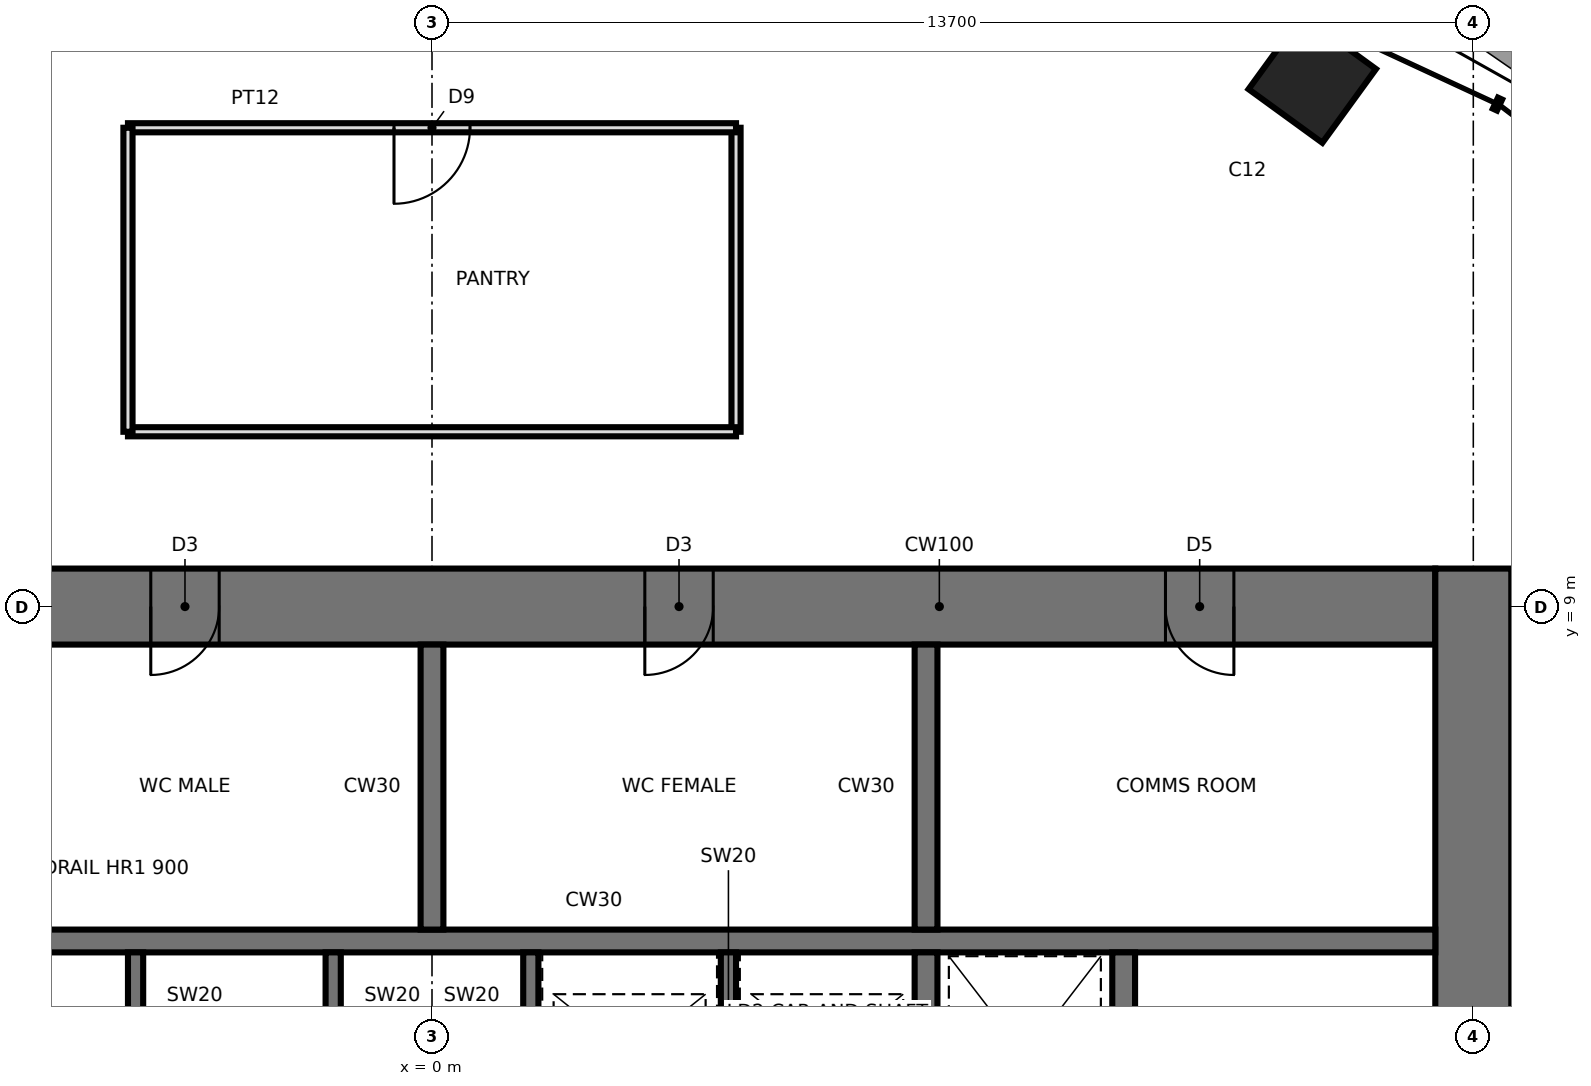
"""IFC4 building model, lengths in metres.
Left out: names, types, materials, properties, quantities, classifications, styles, units other than length and angle.
Written with IfcOpenShell. Run it as: python <this file> out.ifc"""

import sys

from ifc_helpers import new_model, si_unit, direction, frame, frame_2d, origin, origin_2d, place, context, subcontext, project, spatial, rectangle, extrude, element, fill, save


model = new_model("IFC4")
c1 = context("Model", 3, precision=1e-05, world=origin(), true_north=direction((0.0, 1.0)))
c2 = subcontext(c1, "Body", "Model", "MODEL_VIEW")
j1 = project(units=[si_unit("LENGTHUNIT", "METRE"), si_unit("PLANEANGLEUNIT", "RADIAN")], contexts=[c1])
p1 = place(None, origin())
s1 = spatial("IfcSite", under=j1, at=p1, CompositionType="ELEMENT")
p2 = place(p1, origin())
s2 = spatial("IfcBuilding", under=s1, at=p2, CompositionType="ELEMENT")
p3 = place(p2, frame((0.0, 0.0, 272.8)))
s3 = spatial("IfcBuildingStorey", under=s2, at=p3, CompositionType="ELEMENT", Elevation=272.8)
p4 = place(p3, frame((11.581, 15.94, 0.0), z_axis=(0.0, 0.0, 1.0), x_axis=(0.587785252292, 0.809016994375, 0.0)))
e1 = element("IfcColumn", 1, at=p4, inside=s3, PredefinedType="COLUMN", context=c2, shape_type="SweptSolid", body=[
    extrude(rectangle(XDim=1.2, YDim=1.2, at=origin_2d()), origin(), (0.0, 0.0, 1.0), 4.2),
])
p5 = place(p3, frame((13.2, 9.0, 0.0), z_axis=(0.0, 0.0, 1.0), x_axis=(-1.0, 0.0, 0.0)))
e2 = element("IfcWall", 2, at=p5, inside=s3, PredefinedType="SHEAR", context=c2, shape_type="SweptSolid", body=[
    extrude(rectangle(XDim=26.4, YDim=1.0, at=frame_2d((13.2, 0.0))), origin(), (0.0, 0.0, 1.0), 4.2),
])
p6 = place(p5, frame((2.65, 0.0, 0.0)))
e3 = element("IfcOpeningElement", 3, at=p6, cuts=e2, PredefinedType="OPENING", context=c2, shape_type="SweptSolid", body=[
    extrude(rectangle(XDim=0.9, YDim=2.1, at=frame_2d((0.45, 1.05))), frame((0.0, 0.51, 0.0), z_axis=(0.0, -1.0, 0.0), x_axis=(1.0, 0.0, 0.0)), (0.0, 0.0, 1.0), 1.02),
])
p7 = place(p5, frame((9.5, 0.0, 0.0)))
e4 = element("IfcOpeningElement", 4, at=p7, cuts=e2, PredefinedType="OPENING", context=c2, shape_type="SweptSolid", body=[
    extrude(rectangle(XDim=0.9, YDim=2.1, at=frame_2d((0.45, 1.05))), frame((0.0, 0.51, 0.0), z_axis=(0.0, -1.0, 0.0), x_axis=(1.0, 0.0, 0.0)), (0.0, 0.0, 1.0), 1.02),
])
p8 = place(p5, frame((16.0, 0.0, 0.0)))
e5 = element("IfcOpeningElement", 5, at=p8, cuts=e2, PredefinedType="OPENING", context=c2, shape_type="SweptSolid", body=[
    extrude(rectangle(XDim=0.9, YDim=2.1, at=frame_2d((0.45, 1.05))), frame((0.0, 0.51, 0.0), z_axis=(0.0, -1.0, 0.0), x_axis=(1.0, 0.0, 0.0)), (0.0, 0.0, 1.0), 1.02),
])
p9 = place(p5, frame((21.25, 0.0, 0.0)))
e6 = element("IfcOpeningElement", 6, at=p9, cuts=e2, PredefinedType="OPENING", context=c2, shape_type="SweptSolid", body=[
    extrude(rectangle(XDim=0.9, YDim=2.1, at=frame_2d((0.45, 1.05))), frame((0.0, 0.51, 0.0), z_axis=(0.0, -1.0, 0.0), x_axis=(1.0, 0.0, 0.0)), (0.0, 0.0, 1.0), 1.02),
])
p10 = place(p5, frame((24.8, 0.0, 0.0)))
e7 = element("IfcOpeningElement", 7, at=p10, cuts=e2, PredefinedType="OPENING", context=c2, shape_type="SweptSolid", body=[
    extrude(rectangle(XDim=1.0, YDim=2.1, at=frame_2d((0.5, 1.05))), frame((0.0, 0.51, 0.0), z_axis=(0.0, -1.0, 0.0), x_axis=(1.0, 0.0, 0.0)), (0.0, 0.0, 1.0), 1.02),
])
p11 = place(p3, frame((13.7, -9.5, 0.0), z_axis=(0.0, 0.0, 1.0), x_axis=(0.0, 1.0, 0.0)))
e8 = element("IfcWall", 8, at=p11, inside=s3, PredefinedType="SHEAR", context=c2, shape_type="SweptSolid", body=[
    extrude(rectangle(XDim=19.0, YDim=1.0, at=frame_2d((9.5, 0.0))), origin(), (0.0, 0.0, 1.0), 4.2),
])
p12 = place(p11, frame((8.6, 0.0, 0.0)))
e9 = element("IfcOpeningElement", 9, at=p12, cuts=e8, PredefinedType="OPENING", context=c2, shape_type="SweptSolid", body=[
    extrude(rectangle(XDim=1.8, YDim=2.4, at=frame_2d((0.9, 1.2))), frame((0.0, 0.51, 0.0), z_axis=(0.0, -1.0, 0.0), x_axis=(1.0, 0.0, 0.0)), (0.0, 0.0, 1.0), 1.02),
])
p13 = place(p3, frame((-13.2, 4.6, 0.0), z_axis=(0.0, 0.0, 1.0), x_axis=(1.0, 0.0, 0.0)))
e10 = element("IfcWall", 10, at=p13, inside=s3, PredefinedType="SHEAR", context=c2, shape_type="SweptSolid", body=[
    extrude(rectangle(XDim=26.4, YDim=0.3, at=frame_2d((13.2, 0.0))), origin(), (0.0, 0.0, 1.0), 4.2),
])
p14 = place(p3, frame((6.5, 1.75, 0.0), z_axis=(0.0, 0.0, 1.0), x_axis=(0.0, 1.0, 0.0)))
e11 = element("IfcWall", 11, at=p14, inside=s3, PredefinedType="SHEAR", context=c2, shape_type="SweptSolid", body=[
    extrude(rectangle(XDim=2.7, YDim=0.3, at=frame_2d((1.35, 0.0))), origin(), (0.0, 0.0, 1.0), 4.2),
])
p15 = place(p3, frame((6.5, 4.75, 0.0), z_axis=(0.0, 0.0, 1.0), x_axis=(0.0, 1.0, 0.0)))
e12 = element("IfcWall", 12, at=p15, inside=s3, PredefinedType="SHEAR", context=c2, shape_type="SweptSolid", body=[
    extrude(rectangle(XDim=3.75, YDim=0.3, at=frame_2d((1.875, 0.0))), origin(), (0.0, 0.0, 1.0), 4.2),
])
for number, where, z_axis, x_axis in (
    (13, (-3.9, 1.75, 0.0), (0.0, 0.0, 1.0), (0.0, 1.0, 0.0)),
    (14, (-1.3, 1.75, 0.0), (0.0, 0.0, 1.0), (0.0, 1.0, 0.0)),
    (15, (1.3, 1.75, 0.0), (0.0, 0.0, 1.0), (0.0, 1.0, 0.0)),
    (16, (3.9, 1.75, 0.0), (0.0, 0.0, 1.0), (0.0, 1.0, 0.0)),
):
    element("IfcWall", number, at=place(p3, frame(where, z_axis=z_axis, x_axis=x_axis)), inside=s3, PredefinedType="SHEAR", context=c2, shape_type="SweptSolid", body=[
        extrude(rectangle(XDim=2.7, YDim=0.2, at=frame_2d((1.35, 0.0))), origin(), (0.0, 0.0, 1.0), 4.2),
    ])
p16 = place(p3, frame((0.0, 4.75, 0.0), z_axis=(0.0, 0.0, 1.0), x_axis=(0.0, 1.0, 0.0)))
e17 = element("IfcWall", 17, at=p16, inside=s3, PredefinedType="SHEAR", context=c2, shape_type="SweptSolid", body=[
    extrude(rectangle(XDim=3.75, YDim=0.3, at=frame_2d((1.875, 0.0))), origin(), (0.0, 0.0, 1.0), 4.2),
])
p17 = place(p3, frame((9.1, 1.75, 0.0), z_axis=(0.0, 0.0, 1.0), x_axis=(0.0, 1.0, 0.0)))
e18 = element("IfcWall", 18, at=p17, inside=s3, PredefinedType="SHEAR", context=c2, shape_type="SweptSolid", body=[
    extrude(rectangle(XDim=2.7, YDim=0.3, at=frame_2d((1.35, 0.0))), origin(), (0.0, 0.0, 1.0), 4.2),
])
p18 = place(p3, frame((4.0, 15.3, 0.0), z_axis=(0.0, 0.0, 1.0), x_axis=(0.0, -1.0, 0.0)))
e19 = element("IfcWall", 19, at=p18, inside=s3, PredefinedType="PARTITIONING", context=c2, shape_type="SweptSolid", body=[
    extrude(rectangle(XDim=4.0, YDim=0.12, at=frame_2d((2.0, 0.0))), origin(), (0.0, 0.0, 1.0), 4.0),
])
p19 = place(p3, frame((-4.0, 15.3, 0.0), z_axis=(0.0, 0.0, 1.0), x_axis=(1.0, 0.0, 0.0)))
e20 = element("IfcWall", 20, at=p19, inside=s3, PredefinedType="PARTITIONING", context=c2, shape_type="SweptSolid", body=[
    extrude(rectangle(XDim=8.0, YDim=0.12, at=frame_2d((4.0, 0.0))), origin(), (0.0, 0.0, 1.0), 3.546),
])
p20 = place(p19, frame((3.5, 0.0, 0.0)))
e21 = element("IfcOpeningElement", 21, at=p20, cuts=e20, PredefinedType="OPENING", context=c2, shape_type="SweptSolid", body=[
    extrude(rectangle(XDim=1.0, YDim=2.4, at=frame_2d((0.5, 1.2))), frame((0.0, 0.07, 0.0), z_axis=(0.0, -1.0, 0.0), x_axis=(1.0, 0.0, 0.0)), (0.0, 0.0, 1.0), 0.14),
])
p21 = place(p3, frame((4.0, 11.3, 0.0), z_axis=(0.0, 0.0, 1.0), x_axis=(-1.0, 0.0, 0.0)))
e22 = element("IfcWall", 22, at=p21, inside=s3, PredefinedType="PARTITIONING", context=c2, shape_type="SweptSolid", body=[
    extrude(rectangle(XDim=8.0, YDim=0.12, at=frame_2d((4.0, 0.0))), origin(), (0.0, 0.0, 1.0), 4.0),
])
p22 = place(p3, frame((-4.0, 11.3, 0.0), z_axis=(0.0, 0.0, 1.0), x_axis=(0.0, 1.0, 0.0)))
e23 = element("IfcWall", 23, at=p22, inside=s3, PredefinedType="PARTITIONING", context=c2, shape_type="SweptSolid", body=[
    extrude(rectangle(XDim=4.0, YDim=0.12, at=frame_2d((2.0, 0.0))), origin(), (0.0, 0.0, 1.0), 4.0),
])
p23 = place(p6, origin())
e24 = element("IfcDoor", 24, at=p23, inside=s3, OperationType="SINGLE_SWING_LEFT", PredefinedType="DOOR", context=c2, shape_type="SweptSolid", body=[
    extrude(rectangle(XDim=0.82, YDim=2.06, at=frame_2d((0.45, 1.03))), frame((0.0, 0.025, 0.0), z_axis=(0.0, -1.0, 0.0), x_axis=(1.0, 0.0, 0.0)), (0.0, 0.0, 1.0), 0.05),
    extrude(rectangle(XDim=0.04, YDim=2.1, at=frame_2d((0.02, 1.05))), frame((0.0, 0.25, 0.0), z_axis=(0.0, -1.0, 0.0), x_axis=(1.0, 0.0, 0.0)), (0.0, 0.0, 1.0), 0.5),
    extrude(rectangle(XDim=0.04, YDim=2.1, at=frame_2d((0.88, 1.05))), frame((0.0, 0.25, 0.0), z_axis=(0.0, -1.0, 0.0), x_axis=(1.0, 0.0, 0.0)), (0.0, 0.0, 1.0), 0.5),
    extrude(rectangle(XDim=0.82, YDim=0.04, at=frame_2d((0.45, 2.08))), frame((0.0, 0.25, 0.0), z_axis=(0.0, -1.0, 0.0), x_axis=(1.0, 0.0, 0.0)), (0.0, 0.0, 1.0), 0.5),
])
fill(e3, e24)
p24 = place(p7, origin())
e25 = element("IfcDoor", 25, at=p24, inside=s3, OperationType="SINGLE_SWING_RIGHT", PredefinedType="DOOR", context=c2, shape_type="SweptSolid", body=[
    extrude(rectangle(XDim=0.82, YDim=2.06, at=frame_2d((0.45, 1.03))), frame((0.0, 0.025, 0.0), z_axis=(0.0, -1.0, 0.0), x_axis=(1.0, 0.0, 0.0)), (0.0, 0.0, 1.0), 0.05),
    extrude(rectangle(XDim=0.04, YDim=2.1, at=frame_2d((0.02, 1.05))), frame((0.0, 0.25, 0.0), z_axis=(0.0, -1.0, 0.0), x_axis=(1.0, 0.0, 0.0)), (0.0, 0.0, 1.0), 0.5),
    extrude(rectangle(XDim=0.04, YDim=2.1, at=frame_2d((0.88, 1.05))), frame((0.0, 0.25, 0.0), z_axis=(0.0, -1.0, 0.0), x_axis=(1.0, 0.0, 0.0)), (0.0, 0.0, 1.0), 0.5),
    extrude(rectangle(XDim=0.82, YDim=0.04, at=frame_2d((0.45, 2.08))), frame((0.0, 0.25, 0.0), z_axis=(0.0, -1.0, 0.0), x_axis=(1.0, 0.0, 0.0)), (0.0, 0.0, 1.0), 0.5),
])
fill(e4, e25)
p25 = place(p8, origin())
e26 = element("IfcDoor", 26, at=p25, inside=s3, OperationType="SINGLE_SWING_RIGHT", PredefinedType="DOOR", context=c2, shape_type="SweptSolid", body=[
    extrude(rectangle(XDim=0.82, YDim=2.06, at=frame_2d((0.45, 1.03))), frame((0.0, 0.025, 0.0), z_axis=(0.0, -1.0, 0.0), x_axis=(1.0, 0.0, 0.0)), (0.0, 0.0, 1.0), 0.05),
    extrude(rectangle(XDim=0.04, YDim=2.1, at=frame_2d((0.02, 1.05))), frame((0.0, 0.25, 0.0), z_axis=(0.0, -1.0, 0.0), x_axis=(1.0, 0.0, 0.0)), (0.0, 0.0, 1.0), 0.5),
    extrude(rectangle(XDim=0.04, YDim=2.1, at=frame_2d((0.88, 1.05))), frame((0.0, 0.25, 0.0), z_axis=(0.0, -1.0, 0.0), x_axis=(1.0, 0.0, 0.0)), (0.0, 0.0, 1.0), 0.5),
    extrude(rectangle(XDim=0.82, YDim=0.04, at=frame_2d((0.45, 2.08))), frame((0.0, 0.25, 0.0), z_axis=(0.0, -1.0, 0.0), x_axis=(1.0, 0.0, 0.0)), (0.0, 0.0, 1.0), 0.5),
])
fill(e5, e26)
p26 = place(p20, frame((1.0, 0.0, 0.0), z_axis=(0.0, 0.0, 1.0), x_axis=(-1.0, 0.0, 0.0)))
e27 = element("IfcDoor", 27, at=p26, inside=s3, OperationType="SINGLE_SWING_RIGHT", PredefinedType="DOOR", context=c2, shape_type="SweptSolid", body=[
    extrude(rectangle(XDim=1.0, YDim=2.4, at=frame_2d((0.5, 1.2))), frame((0.0, 0.025, 0.0), z_axis=(0.0, -1.0, 0.0), x_axis=(1.0, 0.0, 0.0)), (0.0, 0.0, 1.0), 0.05),
])
fill(e21, e27)
save(model, sys.argv[1])
